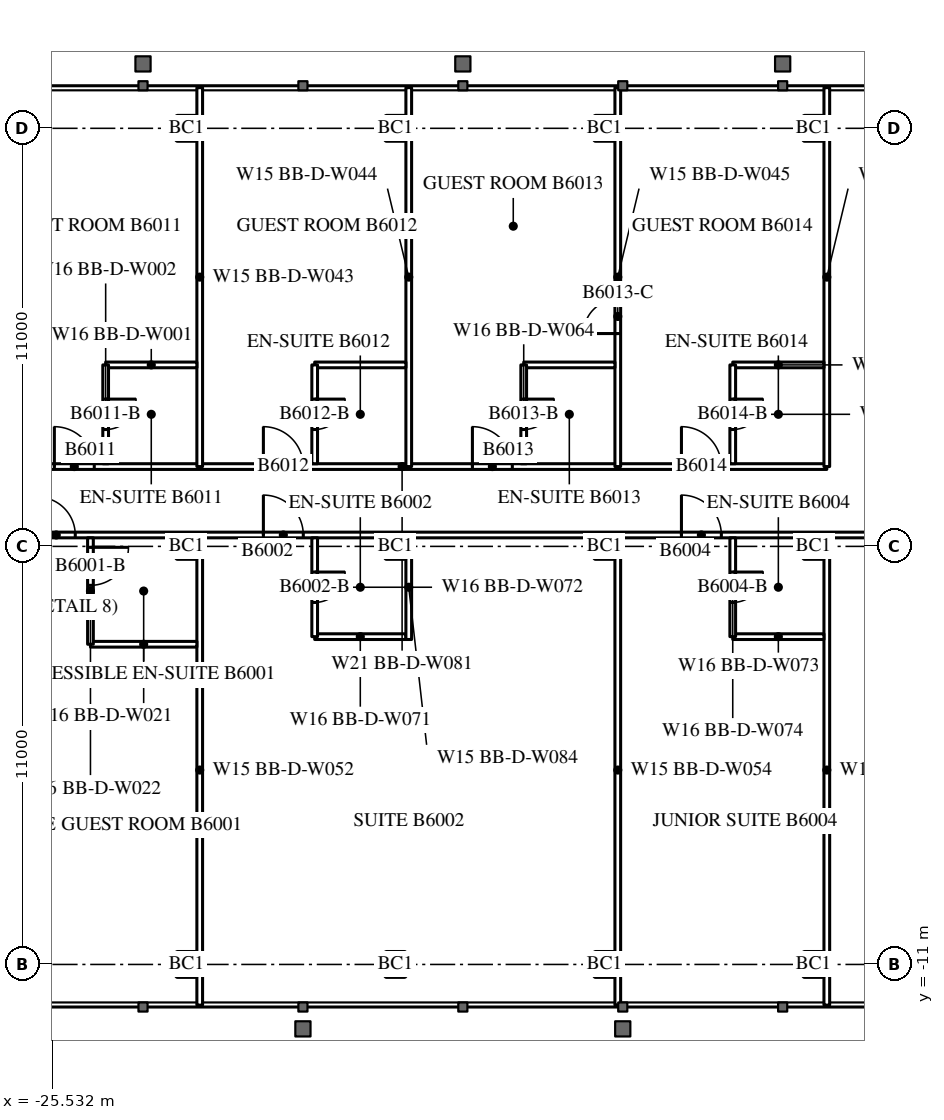
"""IFC4 building model, lengths in metres.
Left out: names, types, materials, properties, quantities, classifications, styles, units other than length and angle.
Written with IfcOpenShell. Run it as: python <this file> out.ifc"""

import sys

from ifc_helpers import new_model, si_unit, direction, frame, frame_2d, origin, origin_2d, place, context, subcontext, project, spatial, rectangle, i_section, extrude, element, fill, save


model = new_model("IFC4")
c1 = context("Model", 3, precision=1e-05, world=origin(), true_north=direction((0.0, 1.0)))
c2 = subcontext(c1, "Body", "Model", "MODEL_VIEW")
j1 = project(units=[si_unit("LENGTHUNIT", "METRE"), si_unit("PLANEANGLEUNIT", "RADIAN")], contexts=[c1])
p1 = place(None, origin())
s1 = spatial("IfcSite", under=j1, at=p1, CompositionType="ELEMENT")
p2 = place(p1, origin())
s2 = spatial("IfcBuilding", under=s1, at=p2, CompositionType="ELEMENT")
p3 = place(p2, frame((0.0, 0.0, 226.1)))
s3 = spatial("IfcBuildingStorey", under=s2, at=p3, CompositionType="ELEMENT", Elevation=226.1)
for number, where, z_axis, x_axis in (
    (1, (-22.0, -11.0, 0.0), (0.0, 0.0, 1.0), (1.0, 0.0, 0.0)),
    (2, (-16.5, -11.0, 0.0), (0.0, 0.0, 1.0), (1.0, 0.0, 0.0)),
    (3, (-11.0, -11.0, 0.0), (0.0, 0.0, 1.0), (1.0, 0.0, 0.0)),
    (4, (-5.5, -11.0, 0.0), (0.0, 0.0, 1.0), (1.0, 0.0, 0.0)),
    (5, (-22.0, 0.0, 0.0), (0.0, 0.0, 1.0), (1.0, 0.0, 0.0)),
    (6, (-16.5, 0.0, 0.0), (0.0, 0.0, 1.0), (1.0, 0.0, 0.0)),
    (7, (-11.0, 0.0, 0.0), (0.0, 0.0, 1.0), (1.0, 0.0, 0.0)),
    (8, (-5.5, 0.0, 0.0), (0.0, 0.0, 1.0), (1.0, 0.0, 0.0)),
    (9, (-22.0, 11.0, 0.0), (0.0, 0.0, 1.0), (1.0, 0.0, 0.0)),
    (10, (-16.5, 11.0, 0.0), (0.0, 0.0, 1.0), (1.0, 0.0, 0.0)),
    (11, (-11.0, 11.0, 0.0), (0.0, 0.0, 1.0), (1.0, 0.0, 0.0)),
    (12, (-5.5, 11.0, 0.0), (0.0, 0.0, 1.0), (1.0, 0.0, 0.0)),
):
    element("IfcColumn", number, at=place(p3, frame(where, z_axis=z_axis, x_axis=x_axis)), inside=s3, PredefinedType="COLUMN", context=c2, shape_type="SweptSolid", body=[
        extrude(i_section(OverallWidth=0.476, OverallDepth=0.6, WebThickness=0.1, FlangeThickness=0.14, FilletRadius=0.02, at=origin_2d()), origin(), (0.0, 0.0, 1.0), 3.6),
    ])
p4 = place(p3, frame((-27.5, 0.3, 0.0), z_axis=(0.0, 0.0, 1.0), x_axis=(1.0, 0.0, 0.0)))
e13 = element("IfcWall", 13, at=p4, inside=s3, PredefinedType="PARTITIONING", context=c2, shape_type="SweptSolid", body=[
    extrude(rectangle(XDim=55.0, YDim=0.15, at=frame_2d((27.5, 0.0))), origin(), (0.0, 0.0, 1.0), 2.4),
])
p5 = place(p4, frame((1.575, 0.0, 0.0)))
e14 = element("IfcOpeningElement", 14, at=p5, cuts=e13, PredefinedType="OPENING", context=c2, shape_type="SweptSolid", body=[
    extrude(rectangle(XDim=1.0, YDim=2.2, at=frame_2d((0.5, 1.1))), frame((0.0, 0.085, 0.0), z_axis=(0.0, -1.0, 0.0), x_axis=(1.0, 0.0, 0.0)), (0.0, 0.0, 1.0), 0.17),
])
p6 = place(p4, frame((7.525, 0.0, 0.0)))
e15 = element("IfcOpeningElement", 15, at=p6, cuts=e13, PredefinedType="OPENING", context=c2, shape_type="SweptSolid", body=[
    extrude(rectangle(XDim=1.05, YDim=2.4, at=frame_2d((0.525, 1.2))), frame((0.0, 0.085, 0.0), z_axis=(0.0, -1.0, 0.0), x_axis=(1.0, 0.0, 0.0)), (0.0, 0.0, 1.0), 0.17),
])
p7 = place(p4, frame((18.525, 0.0, 0.0)))
e16 = element("IfcOpeningElement", 16, at=p7, cuts=e13, PredefinedType="OPENING", context=c2, shape_type="SweptSolid", body=[
    extrude(rectangle(XDim=1.05, YDim=2.4, at=frame_2d((0.525, 1.2))), frame((0.0, 0.085, 0.0), z_axis=(0.0, -1.0, 0.0), x_axis=(1.0, 0.0, 0.0)), (0.0, 0.0, 1.0), 0.17),
])
p8 = place(p4, frame((24.025, 0.0, 0.0)))
e17 = element("IfcOpeningElement", 17, at=p8, cuts=e13, PredefinedType="OPENING", context=c2, shape_type="SweptSolid", body=[
    extrude(rectangle(XDim=1.05, YDim=2.4, at=frame_2d((0.525, 1.2))), frame((0.0, 0.085, 0.0), z_axis=(0.0, -1.0, 0.0), x_axis=(1.0, 0.0, 0.0)), (0.0, 0.0, 1.0), 0.17),
])
p9 = place(p4, frame((35.025, 0.0, 0.0)))
e18 = element("IfcOpeningElement", 18, at=p9, cuts=e13, PredefinedType="OPENING", context=c2, shape_type="SweptSolid", body=[
    extrude(rectangle(XDim=1.05, YDim=2.4, at=frame_2d((0.525, 1.2))), frame((0.0, 0.085, 0.0), z_axis=(0.0, -1.0, 0.0), x_axis=(1.0, 0.0, 0.0)), (0.0, 0.0, 1.0), 0.17),
])
p10 = place(p4, frame((40.525, 0.0, 0.0)))
e19 = element("IfcOpeningElement", 19, at=p10, cuts=e13, PredefinedType="OPENING", context=c2, shape_type="SweptSolid", body=[
    extrude(rectangle(XDim=1.05, YDim=2.4, at=frame_2d((0.525, 1.2))), frame((0.0, 0.085, 0.0), z_axis=(0.0, -1.0, 0.0), x_axis=(1.0, 0.0, 0.0)), (0.0, 0.0, 1.0), 0.17),
])
p11 = place(p4, frame((52.525, 0.0, 0.0)))
e20 = element("IfcOpeningElement", 20, at=p11, cuts=e13, PredefinedType="OPENING", context=c2, shape_type="SweptSolid", body=[
    extrude(rectangle(XDim=1.05, YDim=2.4, at=frame_2d((0.525, 1.2))), frame((0.0, 0.085, 0.0), z_axis=(0.0, -1.0, 0.0), x_axis=(1.0, 0.0, 0.0)), (0.0, 0.0, 1.0), 0.17),
])
p12 = place(p3, frame((-27.5, 2.1, 0.0), z_axis=(0.0, 0.0, 1.0), x_axis=(1.0, 0.0, 0.0)))
e21 = element("IfcWall", 21, at=p12, inside=s3, PredefinedType="PARTITIONING", context=c2, shape_type="SweptSolid", body=[
    extrude(rectangle(XDim=22.35, YDim=0.15, at=frame_2d((11.175, 0.0))), origin(), (0.0, 0.0, 1.0), 3.4),
])
p13 = place(p12, frame((2.025, 0.0, 0.0)))
e22 = element("IfcOpeningElement", 22, at=p13, cuts=e21, PredefinedType="OPENING", context=c2, shape_type="SweptSolid", body=[
    extrude(rectangle(XDim=1.05, YDim=2.4, at=frame_2d((0.525, 1.2))), frame((0.0, 0.085, 0.0), z_axis=(0.0, -1.0, 0.0), x_axis=(1.0, 0.0, 0.0)), (0.0, 0.0, 1.0), 0.17),
])
p14 = place(p12, frame((7.525, 0.0, 0.0)))
e23 = element("IfcOpeningElement", 23, at=p14, cuts=e21, PredefinedType="OPENING", context=c2, shape_type="SweptSolid", body=[
    extrude(rectangle(XDim=1.05, YDim=2.4, at=frame_2d((0.525, 1.2))), frame((0.0, 0.085, 0.0), z_axis=(0.0, -1.0, 0.0), x_axis=(1.0, 0.0, 0.0)), (0.0, 0.0, 1.0), 0.17),
])
p15 = place(p12, frame((13.025, 0.0, 0.0)))
e24 = element("IfcOpeningElement", 24, at=p15, cuts=e21, PredefinedType="OPENING", context=c2, shape_type="SweptSolid", body=[
    extrude(rectangle(XDim=1.05, YDim=2.4, at=frame_2d((0.525, 1.2))), frame((0.0, 0.085, 0.0), z_axis=(0.0, -1.0, 0.0), x_axis=(1.0, 0.0, 0.0)), (0.0, 0.0, 1.0), 0.17),
])
p16 = place(p12, frame((18.525, 0.0, 0.0)))
e25 = element("IfcOpeningElement", 25, at=p16, cuts=e21, PredefinedType="OPENING", context=c2, shape_type="SweptSolid", body=[
    extrude(rectangle(XDim=1.05, YDim=2.4, at=frame_2d((0.525, 1.2))), frame((0.0, 0.085, 0.0), z_axis=(0.0, -1.0, 0.0), x_axis=(1.0, 0.0, 0.0)), (0.0, 0.0, 1.0), 0.17),
])
for number, where, z_axis, x_axis in (
    (26, (-21.65, -12.07, 0.0), (0.0, 0.0, 1.0), (0.0, 1.0, 0.0)),
    (27, (-10.65, -12.07, 0.0), (0.0, 0.0, 1.0), (0.0, 1.0, 0.0)),
    (28, (-5.15, -12.07, 0.0), (0.0, 0.0, 1.0), (0.0, 1.0, 0.0)),
):
    element("IfcWall", number, at=place(p3, frame(where, z_axis=z_axis, x_axis=x_axis)), inside=s3, PredefinedType="PARTITIONING", context=c2, shape_type="SweptSolid", body=[
        extrude(rectangle(XDim=12.37, YDim=0.15, at=frame_2d((6.185, 0.0))), origin(), (0.0, 0.0, 1.0), 3.4),
    ])
p17 = place(p3, frame((-24.525, -2.575, 0.0), z_axis=(0.0, 0.0, 1.0), x_axis=(1.0, 0.0, 0.0)))
e29 = element("IfcWall", 29, at=p17, inside=s3, PredefinedType="PARTITIONING", context=c2, shape_type="SweptSolid", body=[
    extrude(rectangle(XDim=2.8, YDim=0.15, at=frame_2d((1.4, 0.0))), origin(), (0.0, 0.0, 1.0), 3.4),
])
p18 = place(p3, frame((-24.525, -2.575, 0.0), z_axis=(0.0, 0.0, 1.0), x_axis=(0.0, 1.0, 0.0)))
e30 = element("IfcWall", 30, at=p18, inside=s3, PredefinedType="PARTITIONING", context=c2, shape_type="SweptSolid", body=[
    extrude(rectangle(XDim=2.8, YDim=0.15, at=frame_2d((1.4, 0.0))), origin(), (0.0, 0.0, 1.0), 3.4),
])
p19 = place(p18, frame((1.55, 0.0, 0.0)))
e31 = element("IfcOpeningElement", 31, at=p19, cuts=e30, PredefinedType="OPENING", context=c2, shape_type="SweptSolid", body=[
    extrude(rectangle(XDim=1.0, YDim=2.2, at=frame_2d((0.5, 1.1))), frame((0.0, 0.085, 0.0), z_axis=(0.0, -1.0, 0.0), x_axis=(1.0, 0.0, 0.0)), (0.0, 0.0, 1.0), 0.17),
])
p20 = place(p3, frame((-18.625, -2.375, 0.0), z_axis=(0.0, 0.0, 1.0), x_axis=(1.0, 0.0, 0.0)))
e32 = element("IfcWall", 32, at=p20, inside=s3, PredefinedType="PARTITIONING", context=c2, shape_type="SweptSolid", body=[
    extrude(rectangle(XDim=2.4, YDim=0.15, at=frame_2d((1.2, 0.0))), origin(), (0.0, 0.0, 1.0), 3.4),
])
p21 = place(p3, frame((-18.625, -2.375, 0.0), z_axis=(0.0, 0.0, 1.0), x_axis=(0.0, 1.0, 0.0)))
e33 = element("IfcWall", 33, at=p21, inside=s3, PredefinedType="PARTITIONING", context=c2, shape_type="SweptSolid", body=[
    extrude(rectangle(XDim=2.6, YDim=0.15, at=frame_2d((1.3, 0.0))), origin(), (0.0, 0.0, 1.0), 3.4),
])
p22 = place(p21, frame((0.9, 0.0, 0.0)))
e34 = element("IfcOpeningElement", 34, at=p22, cuts=e33, PredefinedType="OPENING", context=c2, shape_type="SweptSolid", body=[
    extrude(rectangle(XDim=0.8, YDim=2.2, at=frame_2d((0.4, 1.1))), frame((0.0, 0.085, 0.0), z_axis=(0.0, -1.0, 0.0), x_axis=(1.0, 0.0, 0.0)), (0.0, 0.0, 1.0), 0.17),
])
p23 = place(p3, frame((-7.625, -2.375, 0.0), z_axis=(0.0, 0.0, 1.0), x_axis=(1.0, 0.0, 0.0)))
e35 = element("IfcWall", 35, at=p23, inside=s3, PredefinedType="PARTITIONING", context=c2, shape_type="SweptSolid", body=[
    extrude(rectangle(XDim=2.4, YDim=0.15, at=frame_2d((1.2, 0.0))), origin(), (0.0, 0.0, 1.0), 3.4),
])
p24 = place(p3, frame((-7.625, -2.375, 0.0), z_axis=(0.0, 0.0, 1.0), x_axis=(0.0, 1.0, 0.0)))
e36 = element("IfcWall", 36, at=p24, inside=s3, PredefinedType="PARTITIONING", context=c2, shape_type="SweptSolid", body=[
    extrude(rectangle(XDim=2.6, YDim=0.15, at=frame_2d((1.3, 0.0))), origin(), (0.0, 0.0, 1.0), 3.4),
])
p25 = place(p24, frame((0.9, 0.0, 0.0)))
e37 = element("IfcOpeningElement", 37, at=p25, cuts=e36, PredefinedType="OPENING", context=c2, shape_type="SweptSolid", body=[
    extrude(rectangle(XDim=0.8, YDim=2.2, at=frame_2d((0.4, 1.1))), frame((0.0, 0.085, 0.0), z_axis=(0.0, -1.0, 0.0), x_axis=(1.0, 0.0, 0.0)), (0.0, 0.0, 1.0), 0.17),
])
for number, where, z_axis, x_axis in (
    (38, (-21.65, 2.1, 0.0), (0.0, 0.0, 1.0), (0.0, 1.0, 0.0)),
    (39, (-16.15, 2.1, 0.0), (0.0, 0.0, 1.0), (0.0, 1.0, 0.0)),
):
    element("IfcWall", number, at=place(p3, frame(where, z_axis=z_axis, x_axis=x_axis)), inside=s3, PredefinedType="PARTITIONING", context=c2, shape_type="SweptSolid", body=[
        extrude(rectangle(XDim=9.97, YDim=0.15, at=frame_2d((4.985, 0.0))), origin(), (0.0, 0.0, 1.0), 3.4),
    ])
p26 = place(p3, frame((-10.65, 2.1, 0.0), z_axis=(0.0, 0.0, 1.0), x_axis=(0.0, 1.0, 0.0)))
e40 = element("IfcWall", 40, at=p26, inside=s3, PredefinedType="PARTITIONING", context=c2, shape_type="SweptSolid", body=[
    extrude(rectangle(XDim=9.97, YDim=0.15, at=frame_2d((4.985, 0.0))), origin(), (0.0, 0.0, 1.0), 3.4),
])
p27 = place(p26, frame((3.5, 0.0, 0.0)))
e41 = element("IfcOpeningElement", 41, at=p27, cuts=e40, PredefinedType="OPENING", context=c2, shape_type="SweptSolid", body=[
    extrude(rectangle(XDim=0.9, YDim=2.2, at=frame_2d((0.45, 1.1))), frame((0.0, 0.085, 0.0), z_axis=(0.0, -1.0, 0.0), x_axis=(1.0, 0.0, 0.0)), (0.0, 0.0, 1.0), 0.17),
])
p28 = place(p3, frame((-5.15, 2.1, 0.0), z_axis=(0.0, 0.0, 1.0), x_axis=(0.0, 1.0, 0.0)))
e42 = element("IfcWall", 42, at=p28, inside=s3, PredefinedType="PARTITIONING", context=c2, shape_type="SweptSolid", body=[
    extrude(rectangle(XDim=9.97, YDim=0.15, at=frame_2d((4.985, 0.0))), origin(), (0.0, 0.0, 1.0), 3.4),
])
p29 = place(p3, frame((-24.125, 4.775, 0.0), z_axis=(0.0, 0.0, 1.0), x_axis=(1.0, 0.0, 0.0)))
e43 = element("IfcWall", 43, at=p29, inside=s3, PredefinedType="PARTITIONING", context=c2, shape_type="SweptSolid", body=[
    extrude(rectangle(XDim=2.4, YDim=0.15, at=frame_2d((1.2, 0.0))), origin(), (0.0, 0.0, 1.0), 3.4),
])
p30 = place(p3, frame((-24.125, 2.175, 0.0), z_axis=(0.0, 0.0, 1.0), x_axis=(0.0, 1.0, 0.0)))
e44 = element("IfcWall", 44, at=p30, inside=s3, PredefinedType="PARTITIONING", context=c2, shape_type="SweptSolid", body=[
    extrude(rectangle(XDim=2.6, YDim=0.15, at=frame_2d((1.3, 0.0))), origin(), (0.0, 0.0, 1.0), 3.4),
])
p31 = place(p30, frame((0.9, 0.0, 0.0)))
e45 = element("IfcOpeningElement", 45, at=p31, cuts=e44, PredefinedType="OPENING", context=c2, shape_type="SweptSolid", body=[
    extrude(rectangle(XDim=0.8, YDim=2.2, at=frame_2d((0.4, 1.1))), frame((0.0, 0.085, 0.0), z_axis=(0.0, -1.0, 0.0), x_axis=(1.0, 0.0, 0.0)), (0.0, 0.0, 1.0), 0.17),
])
p32 = place(p3, frame((-18.625, 4.775, 0.0), z_axis=(0.0, 0.0, 1.0), x_axis=(1.0, 0.0, 0.0)))
e46 = element("IfcWall", 46, at=p32, inside=s3, PredefinedType="PARTITIONING", context=c2, shape_type="SweptSolid", body=[
    extrude(rectangle(XDim=2.4, YDim=0.15, at=frame_2d((1.2, 0.0))), origin(), (0.0, 0.0, 1.0), 3.4),
])
p33 = place(p3, frame((-18.625, 2.175, 0.0), z_axis=(0.0, 0.0, 1.0), x_axis=(0.0, 1.0, 0.0)))
e47 = element("IfcWall", 47, at=p33, inside=s3, PredefinedType="PARTITIONING", context=c2, shape_type="SweptSolid", body=[
    extrude(rectangle(XDim=2.6, YDim=0.15, at=frame_2d((1.3, 0.0))), origin(), (0.0, 0.0, 1.0), 3.4),
])
p34 = place(p33, frame((0.9, 0.0, 0.0)))
e48 = element("IfcOpeningElement", 48, at=p34, cuts=e47, PredefinedType="OPENING", context=c2, shape_type="SweptSolid", body=[
    extrude(rectangle(XDim=0.8, YDim=2.2, at=frame_2d((0.4, 1.1))), frame((0.0, 0.085, 0.0), z_axis=(0.0, -1.0, 0.0), x_axis=(1.0, 0.0, 0.0)), (0.0, 0.0, 1.0), 0.17),
])
p35 = place(p3, frame((-13.125, 4.775, 0.0), z_axis=(0.0, 0.0, 1.0), x_axis=(1.0, 0.0, 0.0)))
e49 = element("IfcWall", 49, at=p35, inside=s3, PredefinedType="PARTITIONING", context=c2, shape_type="SweptSolid", body=[
    extrude(rectangle(XDim=2.4, YDim=0.15, at=frame_2d((1.2, 0.0))), origin(), (0.0, 0.0, 1.0), 3.4),
])
p36 = place(p3, frame((-13.125, 2.175, 0.0), z_axis=(0.0, 0.0, 1.0), x_axis=(0.0, 1.0, 0.0)))
e50 = element("IfcWall", 50, at=p36, inside=s3, PredefinedType="PARTITIONING", context=c2, shape_type="SweptSolid", body=[
    extrude(rectangle(XDim=2.6, YDim=0.15, at=frame_2d((1.3, 0.0))), origin(), (0.0, 0.0, 1.0), 3.4),
])
p37 = place(p36, frame((0.9, 0.0, 0.0)))
e51 = element("IfcOpeningElement", 51, at=p37, cuts=e50, PredefinedType="OPENING", context=c2, shape_type="SweptSolid", body=[
    extrude(rectangle(XDim=0.8, YDim=2.2, at=frame_2d((0.4, 1.1))), frame((0.0, 0.085, 0.0), z_axis=(0.0, -1.0, 0.0), x_axis=(1.0, 0.0, 0.0)), (0.0, 0.0, 1.0), 0.17),
])
p38 = place(p3, frame((-7.625, 4.775, 0.0), z_axis=(0.0, 0.0, 1.0), x_axis=(1.0, 0.0, 0.0)))
e52 = element("IfcWall", 52, at=p38, inside=s3, PredefinedType="PARTITIONING", context=c2, shape_type="SweptSolid", body=[
    extrude(rectangle(XDim=2.4, YDim=0.15, at=frame_2d((1.2, 0.0))), origin(), (0.0, 0.0, 1.0), 3.4),
])
p39 = place(p3, frame((-7.625, 2.175, 0.0), z_axis=(0.0, 0.0, 1.0), x_axis=(0.0, 1.0, 0.0)))
e53 = element("IfcWall", 53, at=p39, inside=s3, PredefinedType="PARTITIONING", context=c2, shape_type="SweptSolid", body=[
    extrude(rectangle(XDim=2.6, YDim=0.15, at=frame_2d((1.3, 0.0))), origin(), (0.0, 0.0, 1.0), 3.4),
])
p40 = place(p39, frame((0.9, 0.0, 0.0)))
e54 = element("IfcOpeningElement", 54, at=p40, cuts=e53, PredefinedType="OPENING", context=c2, shape_type="SweptSolid", body=[
    extrude(rectangle(XDim=0.8, YDim=2.2, at=frame_2d((0.4, 1.1))), frame((0.0, 0.085, 0.0), z_axis=(0.0, -1.0, 0.0), x_axis=(1.0, 0.0, 0.0)), (0.0, 0.0, 1.0), 0.17),
])
p41 = place(p3, frame((-16.15, -2.45, 0.0), z_axis=(0.0, 0.0, 1.0), x_axis=(0.0, 1.0, 0.0)))
e55 = element("IfcWall", 55, at=p41, inside=s3, PredefinedType="PARTITIONING", context=c2, shape_type="SweptSolid", body=[
    extrude(rectangle(XDim=2.75, YDim=0.15, at=frame_2d((1.375, 0.0))), origin(), (0.0, 0.0, 1.0), 3.4),
])
p42 = place(p19, origin())
e56 = element("IfcDoor", 56, at=p42, inside=s3, OperationType="SINGLE_SWING_RIGHT", PredefinedType="DOOR", context=c2, shape_type="SweptSolid", body=[
    extrude(rectangle(XDim=1.0, YDim=2.2, at=frame_2d((0.5, 1.1))), frame((0.0, 0.025, 0.0), z_axis=(0.0, -1.0, 0.0), x_axis=(1.0, 0.0, 0.0)), (0.0, 0.0, 1.0), 0.05),
])
fill(e31, e56)
p43 = place(p5, origin())
e57 = element("IfcDoor", 57, at=p43, inside=s3, OperationType="SINGLE_SWING_LEFT", PredefinedType="DOOR", context=c2, shape_type="SweptSolid", body=[
    extrude(rectangle(XDim=1.0, YDim=2.2, at=frame_2d((0.5, 1.1))), frame((0.0, 0.025, 0.0), z_axis=(0.0, -1.0, 0.0), x_axis=(1.0, 0.0, 0.0)), (0.0, 0.0, 1.0), 0.05),
])
fill(e14, e57)
p44 = place(p22, origin())
e58 = element("IfcDoor", 58, at=p44, inside=s3, OperationType="SINGLE_SWING_RIGHT", PredefinedType="DOOR", context=c2, shape_type="SweptSolid", body=[
    extrude(rectangle(XDim=0.8, YDim=2.2, at=frame_2d((0.4, 1.1))), frame((0.0, 0.025, 0.0), z_axis=(0.0, -1.0, 0.0), x_axis=(1.0, 0.0, 0.0)), (0.0, 0.0, 1.0), 0.05),
])
fill(e34, e58)
p45 = place(p6, origin())
e59 = element("IfcDoor", 59, at=p45, inside=s3, OperationType="SINGLE_SWING_LEFT", PredefinedType="DOOR", context=c2, shape_type="SweptSolid", body=[
    extrude(rectangle(XDim=1.05, YDim=2.4, at=frame_2d((0.525, 1.2))), frame((0.0, 0.025, 0.0), z_axis=(0.0, -1.0, 0.0), x_axis=(1.0, 0.0, 0.0)), (0.0, 0.0, 1.0), 0.05),
])
fill(e15, e59)
p46 = place(p25, origin())
e60 = element("IfcDoor", 60, at=p46, inside=s3, OperationType="SINGLE_SWING_RIGHT", PredefinedType="DOOR", context=c2, shape_type="SweptSolid", body=[
    extrude(rectangle(XDim=0.8, YDim=2.2, at=frame_2d((0.4, 1.1))), frame((0.0, 0.025, 0.0), z_axis=(0.0, -1.0, 0.0), x_axis=(1.0, 0.0, 0.0)), (0.0, 0.0, 1.0), 0.05),
])
fill(e37, e60)
p47 = place(p7, origin())
e61 = element("IfcDoor", 61, at=p47, inside=s3, OperationType="SINGLE_SWING_LEFT", PredefinedType="DOOR", context=c2, shape_type="SweptSolid", body=[
    extrude(rectangle(XDim=1.05, YDim=2.4, at=frame_2d((0.525, 1.2))), frame((0.0, 0.025, 0.0), z_axis=(0.0, -1.0, 0.0), x_axis=(1.0, 0.0, 0.0)), (0.0, 0.0, 1.0), 0.05),
])
fill(e16, e61)
p48 = place(p31, origin())
e62 = element("IfcDoor", 62, at=p48, inside=s3, OperationType="SINGLE_SWING_RIGHT", PredefinedType="DOOR", context=c2, shape_type="SweptSolid", body=[
    extrude(rectangle(XDim=0.8, YDim=2.2, at=frame_2d((0.4, 1.1))), frame((0.0, 0.025, 0.0), z_axis=(0.0, -1.0, 0.0), x_axis=(1.0, 0.0, 0.0)), (0.0, 0.0, 1.0), 0.05),
])
fill(e45, e62)
p49 = place(p13, origin())
e63 = element("IfcDoor", 63, at=p49, inside=s3, OperationType="SINGLE_SWING_LEFT", PredefinedType="DOOR", context=c2, shape_type="SweptSolid", body=[
    extrude(rectangle(XDim=1.05, YDim=2.4, at=frame_2d((0.525, 1.2))), frame((0.0, 0.025, 0.0), z_axis=(0.0, -1.0, 0.0), x_axis=(1.0, 0.0, 0.0)), (0.0, 0.0, 1.0), 0.05),
])
fill(e22, e63)
p50 = place(p34, origin())
e64 = element("IfcDoor", 64, at=p50, inside=s3, OperationType="SINGLE_SWING_RIGHT", PredefinedType="DOOR", context=c2, shape_type="SweptSolid", body=[
    extrude(rectangle(XDim=0.8, YDim=2.2, at=frame_2d((0.4, 1.1))), frame((0.0, 0.025, 0.0), z_axis=(0.0, -1.0, 0.0), x_axis=(1.0, 0.0, 0.0)), (0.0, 0.0, 1.0), 0.05),
])
fill(e48, e64)
p51 = place(p14, origin())
e65 = element("IfcDoor", 65, at=p51, inside=s3, OperationType="SINGLE_SWING_LEFT", PredefinedType="DOOR", context=c2, shape_type="SweptSolid", body=[
    extrude(rectangle(XDim=1.05, YDim=2.4, at=frame_2d((0.525, 1.2))), frame((0.0, 0.025, 0.0), z_axis=(0.0, -1.0, 0.0), x_axis=(1.0, 0.0, 0.0)), (0.0, 0.0, 1.0), 0.05),
])
fill(e23, e65)
p52 = place(p37, origin())
e66 = element("IfcDoor", 66, at=p52, inside=s3, OperationType="SINGLE_SWING_RIGHT", PredefinedType="DOOR", context=c2, shape_type="SweptSolid", body=[
    extrude(rectangle(XDim=0.8, YDim=2.2, at=frame_2d((0.4, 1.1))), frame((0.0, 0.025, 0.0), z_axis=(0.0, -1.0, 0.0), x_axis=(1.0, 0.0, 0.0)), (0.0, 0.0, 1.0), 0.05),
])
fill(e51, e66)
p53 = place(p15, origin())
e67 = element("IfcDoor", 67, at=p53, inside=s3, OperationType="SINGLE_SWING_LEFT", PredefinedType="DOOR", context=c2, shape_type="SweptSolid", body=[
    extrude(rectangle(XDim=1.05, YDim=2.4, at=frame_2d((0.525, 1.2))), frame((0.0, 0.025, 0.0), z_axis=(0.0, -1.0, 0.0), x_axis=(1.0, 0.0, 0.0)), (0.0, 0.0, 1.0), 0.05),
])
fill(e24, e67)
p54 = place(p40, origin())
e68 = element("IfcDoor", 68, at=p54, inside=s3, OperationType="SINGLE_SWING_RIGHT", PredefinedType="DOOR", context=c2, shape_type="SweptSolid", body=[
    extrude(rectangle(XDim=0.8, YDim=2.2, at=frame_2d((0.4, 1.1))), frame((0.0, 0.025, 0.0), z_axis=(0.0, -1.0, 0.0), x_axis=(1.0, 0.0, 0.0)), (0.0, 0.0, 1.0), 0.05),
])
fill(e54, e68)
p55 = place(p16, origin())
e69 = element("IfcDoor", 69, at=p55, inside=s3, OperationType="SINGLE_SWING_LEFT", PredefinedType="DOOR", context=c2, shape_type="SweptSolid", body=[
    extrude(rectangle(XDim=1.05, YDim=2.4, at=frame_2d((0.525, 1.2))), frame((0.0, 0.025, 0.0), z_axis=(0.0, -1.0, 0.0), x_axis=(1.0, 0.0, 0.0)), (0.0, 0.0, 1.0), 0.05),
])
fill(e25, e69)
p56 = place(p27, origin())
e70 = element("IfcDoor", 70, at=p56, inside=s3, OperationType="SINGLE_SWING_LEFT", PredefinedType="DOOR", context=c2, shape_type="SweptSolid", body=[
    extrude(rectangle(XDim=0.9, YDim=2.2, at=frame_2d((0.45, 1.1))), frame((0.0, 0.025, 0.0), z_axis=(0.0, -1.0, 0.0), x_axis=(1.0, 0.0, 0.0)), (0.0, 0.0, 1.0), 0.05),
])
fill(e41, e70)
save(model, sys.argv[1])
